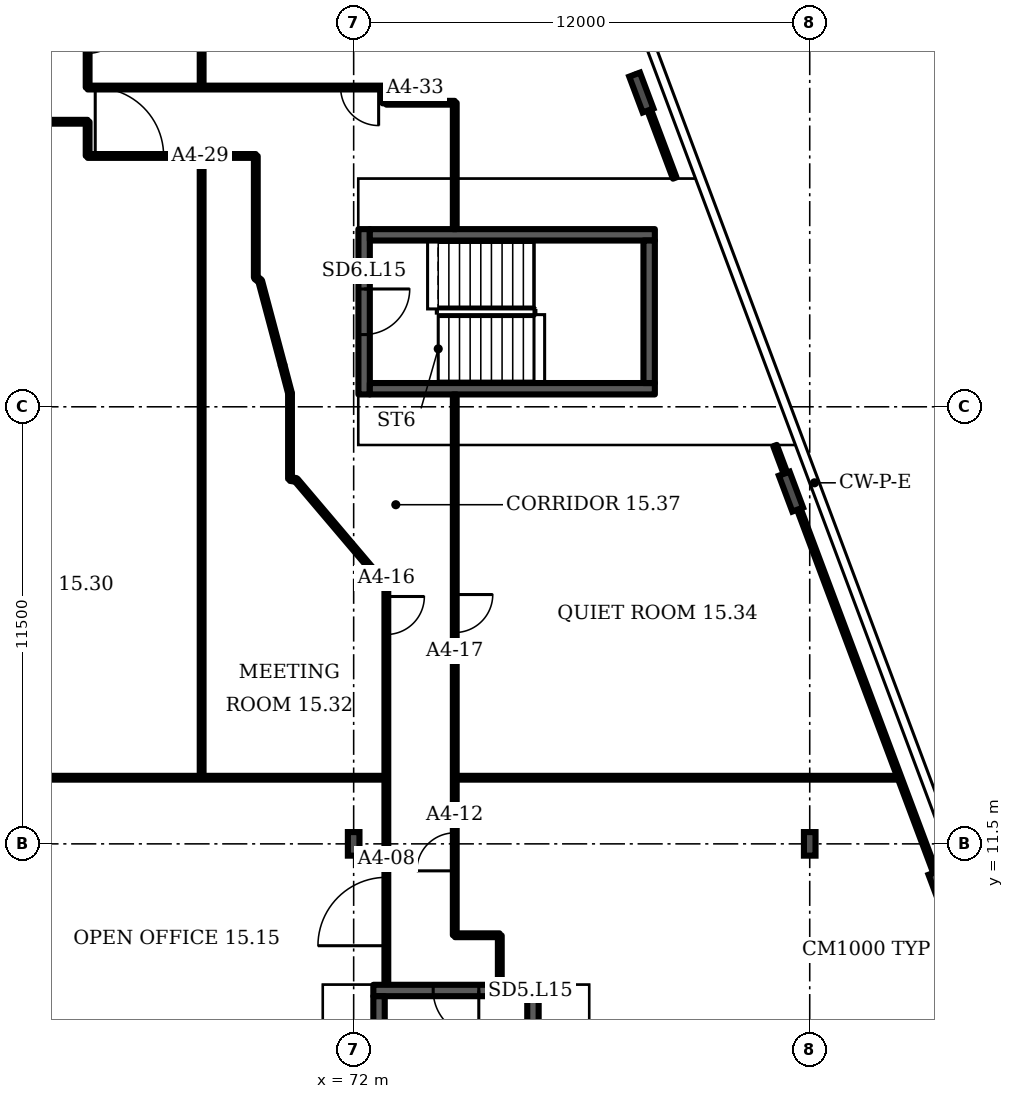
"""IFC4 building model, lengths in metres.
Left out: names, types, materials, properties, quantities, classifications, styles, units other than length and angle.
Written with IfcOpenShell. Run it as: python <this file> out.ifc"""

import sys

from ifc_helpers import new_model, si_unit, direction, frame, frame_2d, origin, origin_2d, place, context, subcontext, project, spatial, rectangle, i_section, extrude, element, fill, save


model = new_model("IFC4")
c1 = context("Model", 3, precision=1e-05, world=origin(), true_north=direction((0.0, 1.0)))
c2 = subcontext(c1, "Body", "Model", "MODEL_VIEW")
j1 = project(units=[si_unit("LENGTHUNIT", "METRE"), si_unit("PLANEANGLEUNIT", "RADIAN")], contexts=[c1])
p1 = place(None, origin())
s1 = spatial("IfcSite", under=j1, at=p1, CompositionType="ELEMENT")
p2 = place(p1, origin())
s2 = spatial("IfcBuilding", under=s1, at=p2, CompositionType="ELEMENT")
p3 = place(p2, frame((0.0, 0.0, 73.9)))
s3 = spatial("IfcBuildingStorey", under=s2, at=p3, CompositionType="ELEMENT", Elevation=73.9)
for number, where, z_axis, x_axis in (
    (1, (87.445, 10.268, 0.0), (0.0, 0.0, 1.0), (0.936, 0.351, 0.0)),
    (2, (83.507, 20.768, 0.0), (0.0, 0.0, 1.0), (0.936, 0.351, 0.0)),
    (3, (79.57, 31.268, 0.0), (0.0, 0.0, 1.0), (0.936, 0.351, 0.0)),
):
    element("IfcColumn", number, at=place(p3, frame(where, z_axis=z_axis, x_axis=x_axis)), inside=s3, PredefinedType="COLUMN", context=c2, shape_type="SweptSolid", body=[
        extrude(i_section(OverallWidth=0.302, OverallDepth=1.008, WebThickness=0.021, FlangeThickness=0.04, FilletRadius=0.03, at=origin_2d()), origin(), (0.0, 0.0, 1.0), 3.6),
    ])
for number, where, z_axis, x_axis in (
    (4, (72.0, 11.5, 0.0), (0.0, 0.0, 1.0), (1.0, 0.0, 0.0)),
    (5, (84.0, 11.5, 0.0), (0.0, 0.0, 1.0), (1.0, 0.0, 0.0)),
):
    element("IfcColumn", number, at=place(p3, frame(where, z_axis=z_axis, x_axis=x_axis)), inside=s3, PredefinedType="COLUMN", context=c2, shape_type="SweptSolid", body=[
        extrude(i_section(OverallWidth=0.305, OverallDepth=0.62, WebThickness=0.021, FlangeThickness=0.04, FilletRadius=0.027, at=origin_2d()), origin(), (0.0, 0.0, 1.0), 3.6),
    ])
p4 = place(p3, frame((72.518, 7.642, 0.0), z_axis=(0.0, 0.0, 1.0), x_axis=(1.0, 0.0, 0.0)))
e6 = element("IfcWall", 6, at=p4, inside=s3, PredefinedType="SHEAR", context=c2, shape_type="SweptSolid", body=[
    extrude(rectangle(XDim=4.35, YDim=0.3, at=frame_2d((2.175, 0.0))), origin(), (0.0, 0.0, 1.0), 3.2),
])
p5 = place(p4, frame((1.575, 0.0, 0.0)))
e7 = element("IfcOpeningElement", 7, at=p5, cuts=e6, PredefinedType="OPENING", context=c2, shape_type="SweptSolid", body=[
    extrude(rectangle(XDim=1.2, YDim=2.1, at=frame_2d((0.6, 1.05))), frame((0.0, 0.16, 0.0), z_axis=(0.0, -1.0, 0.0), x_axis=(1.0, 0.0, 0.0)), (0.0, 0.0, 1.0), 0.32),
])
p6 = place(p3, frame((72.275, 23.325, 0.0), z_axis=(0.0, 0.0, 1.0), x_axis=(0.0, 1.0, 0.0)))
e8 = element("IfcWall", 8, at=p6, inside=s3, PredefinedType="SHEAR", context=c2, shape_type="SweptSolid", body=[
    extrude(rectangle(XDim=4.35, YDim=0.3, at=frame_2d((2.175, 0.0))), origin(), (0.0, 0.0, 1.0), 3.2),
])
p7 = place(p6, frame((1.575, 0.0, 0.0)))
e9 = element("IfcOpeningElement", 9, at=p7, cuts=e8, PredefinedType="OPENING", context=c2, shape_type="SweptSolid", body=[
    extrude(rectangle(XDim=1.2, YDim=2.1, at=frame_2d((0.6, 1.05))), frame((0.0, 0.16, 0.0), z_axis=(0.0, -1.0, 0.0), x_axis=(1.0, 0.0, 0.0)), (0.0, 0.0, 1.0), 0.32),
])
p8 = place(p3, frame((45.3, 13.24, 0.0), z_axis=(0.0, 0.0, 1.0), x_axis=(1.0, 0.0, 0.0)))
e10 = element("IfcWall", 10, at=p8, inside=s3, PredefinedType="PARTITIONING", context=c2, shape_type="SweptSolid", body=[
    extrude(rectangle(XDim=27.56, YDim=0.1, at=frame_2d((13.78, 0.0))), origin(), (0.0, 0.0, 1.0), 3.2),
])
p9 = place(p3, frame((45.3, 30.5, 0.0), z_axis=(0.0, 0.0, 1.0), x_axis=(1.0, 0.0, 0.0)))
e11 = element("IfcWall", 11, at=p9, inside=s3, PredefinedType="PARTITIONING", context=c2, shape_type="SweptSolid", body=[
    extrude(rectangle(XDim=19.7, YDim=0.1, at=frame_2d((9.85, 0.0))), origin(), (0.0, 0.0, 1.0), 3.2),
])
p10 = place(p3, frame((65.0, 29.6, 0.0), z_axis=(0.0, 0.0, 1.0), x_axis=(0.0, 1.0, 0.0)))
e12 = element("IfcWall", 12, at=p10, inside=s3, PredefinedType="PARTITIONING", context=c2, shape_type="SweptSolid", body=[
    extrude(rectangle(XDim=0.9, YDim=0.1, at=frame_2d((0.45, 0.0))), origin(), (0.0, 0.0, 1.0), 3.2),
])
p11 = place(p3, frame((65.0, 29.6, 0.0), z_axis=(0.0, 0.0, 1.0), x_axis=(1.0, 0.0, 0.0)))
e13 = element("IfcWall", 13, at=p11, inside=s3, PredefinedType="PARTITIONING", context=c2, shape_type="SweptSolid", body=[
    extrude(rectangle(XDim=4.425, YDim=0.1, at=frame_2d((2.212, 0.0))), origin(), (0.0, 0.0, 1.0), 3.2),
])
p12 = place(p11, frame((0.2, 0.0, 0.0)))
e14 = element("IfcOpeningElement", 14, at=p12, cuts=e13, PredefinedType="OPENING", context=c2, shape_type="SweptSolid", body=[
    extrude(rectangle(XDim=1.8, YDim=2.1, at=frame_2d((0.9, 1.05))), frame((0.0, 0.06, 0.0), z_axis=(0.0, -1.0, 0.0), x_axis=(1.0, 0.0, 0.0)), (0.0, 0.0, 1.0), 0.12),
])
p13 = place(p3, frame((65.0, 31.4, 0.0), z_axis=(0.0, 0.0, 1.0), x_axis=(0.0, 1.0, 0.0)))
e15 = element("IfcWall", 15, at=p13, inside=s3, PredefinedType="PARTITIONING", context=c2, shape_type="SweptSolid", body=[
    extrude(rectangle(XDim=2.58, YDim=0.1, at=frame_2d((1.29, 0.0))), origin(), (0.0, 0.0, 1.0), 3.2),
])
p14 = place(p13, frame((0.9, 0.0, 0.0)))
e16 = element("IfcOpeningElement", 16, at=p14, cuts=e15, PredefinedType="OPENING", context=c2, shape_type="SweptSolid", body=[
    extrude(rectangle(XDim=1.0, YDim=2.1, at=frame_2d((0.5, 1.05))), frame((0.0, 0.06, 0.0), z_axis=(0.0, -1.0, 0.0), x_axis=(1.0, 0.0, 0.0)), (0.0, 0.0, 1.0), 0.12),
])
p15 = place(p3, frame((65.0, 31.4, 0.0), z_axis=(0.0, 0.0, 1.0), x_axis=(1.0, 0.0, 0.0)))
e17 = element("IfcWall", 17, at=p15, inside=s3, PredefinedType="PARTITIONING", context=c2, shape_type="SweptSolid", body=[
    extrude(rectangle(XDim=7.81, YDim=0.1, at=frame_2d((3.905, 0.0))), origin(), (0.0, 0.0, 1.0), 3.2),
])
p16 = place(p15, frame((6.657, 0.0, 0.0)))
e18 = element("IfcOpeningElement", 18, at=p16, cuts=e17, PredefinedType="OPENING", context=c2, shape_type="SweptSolid", body=[
    extrude(rectangle(XDim=1.0, YDim=2.1, at=frame_2d((0.5, 1.05))), frame((0.0, 0.06, 0.0), z_axis=(0.0, -1.0, 0.0), x_axis=(1.0, 0.0, 0.0)), (0.0, 0.0, 1.0), 0.12),
])
p17 = place(p3, frame((68.0, 13.24, 0.0), z_axis=(0.0, 0.0, 1.0), x_axis=(0.0, 1.0, 0.0)))
e19 = element("IfcWall", 19, at=p17, inside=s3, PredefinedType="PARTITIONING", context=c2, shape_type="SweptSolid", body=[
    extrude(rectangle(XDim=16.36, YDim=0.1, at=frame_2d((8.18, 0.0))), origin(), (0.0, 0.0, 1.0), 3.2),
])
p18 = place(p3, frame((68.0, 31.4, 0.0), z_axis=(0.0, 0.0, 1.0), x_axis=(0.0, 1.0, 0.0)))
e20 = element("IfcWall", 20, at=p18, inside=s3, PredefinedType="PARTITIONING", context=c2, shape_type="SweptSolid", body=[
    extrude(rectangle(XDim=8.39, YDim=0.1, at=frame_2d((4.195, 0.0))), origin(), (0.0, 0.0, 1.0), 3.2),
])
p19 = place(p3, frame((69.425, 26.4, 0.0), z_axis=(0.0, 0.0, 1.0), x_axis=(0.0, 1.0, 0.0)))
e21 = element("IfcWall", 21, at=p19, inside=s3, PredefinedType="PARTITIONING", context=c2, shape_type="SweptSolid", body=[
    extrude(rectangle(XDim=3.2, YDim=0.1, at=frame_2d((1.6, 0.0))), origin(), (0.0, 0.0, 1.0), 3.2),
])
p20 = place(p3, frame((69.54, 26.31, 0.0), z_axis=(0.0, 0.0, 1.0), x_axis=(-0.787997, 0.615675, 0.0)))
e22 = element("IfcWall", 22, at=p20, inside=s3, PredefinedType="PARTITIONING", context=c2, shape_type="SweptSolid", body=[
    extrude(rectangle(XDim=0.146, YDim=0.1, at=frame_2d((0.073, 0.0))), origin(), (0.0, 0.0, 1.0), 3.2),
])
p21 = place(p3, frame((70.13, 24.095, 0.0), z_axis=(0.0, 0.0, 1.0), x_axis=(-0.257318, 0.966327, 0.0)))
e23 = element("IfcWall", 23, at=p21, inside=s3, PredefinedType="PARTITIONING", context=c2, shape_type="SweptSolid", body=[
    extrude(rectangle(XDim=2.292, YDim=0.1, at=frame_2d((1.146, 0.0))), origin(), (0.0, 0.0, 1.0), 3.2),
])
p22 = place(p3, frame((70.325, 21.1, 0.0), z_axis=(0.0, 0.0, 1.0), x_axis=(0.0, 1.0, 0.0)))
e24 = element("IfcWall", 24, at=p22, inside=s3, PredefinedType="PARTITIONING", context=c2, shape_type="SweptSolid", body=[
    extrude(rectangle(XDim=2.255, YDim=0.1, at=frame_2d((1.127, 0.0))), origin(), (0.0, 0.0, 1.0), 3.2),
])
p23 = place(p3, frame((70.325, 23.355, 0.0), z_axis=(0.0, 0.0, 1.0), x_axis=(-0.254901, 0.966965, 0.0)))
e25 = element("IfcWall", 25, at=p23, inside=s3, PredefinedType="PARTITIONING", context=c2, shape_type="SweptSolid", body=[
    extrude(rectangle(XDim=0.765, YDim=0.1, at=frame_2d((0.383, 0.0))), origin(), (0.0, 0.0, 1.0), 3.2),
])
p24 = place(p3, frame((70.485, 21.075, 0.0), z_axis=(0.0, 0.0, 1.0), x_axis=(-0.987098, 0.160112, 0.0)))
e26 = element("IfcWall", 26, at=p24, inside=s3, PredefinedType="PARTITIONING", context=c2, shape_type="SweptSolid", body=[
    extrude(rectangle(XDim=0.157, YDim=0.1, at=frame_2d((0.079, 0.0))), origin(), (0.0, 0.0, 1.0), 3.2),
])
p25 = place(p3, frame((72.81, 30.985, 0.0), z_axis=(0.0, 0.0, 1.0), x_axis=(0.0, 1.0, 0.0)))
e27 = element("IfcWall", 27, at=p25, inside=s3, PredefinedType="PARTITIONING", context=c2, shape_type="SweptSolid", body=[
    extrude(rectangle(XDim=0.415, YDim=0.1, at=frame_2d((0.208, 0.0))), origin(), (0.0, 0.0, 1.0), 3.2),
])
p26 = place(p3, frame((72.86, 7.812, 0.0), z_axis=(0.0, 0.0, 1.0), x_axis=(0.0, 1.0, 0.0)))
e28 = element("IfcWall", 28, at=p26, inside=s3, PredefinedType="PARTITIONING", context=c2, shape_type="SweptSolid", body=[
    extrude(rectangle(XDim=10.463, YDim=0.1, at=frame_2d((5.231, 0.0))), origin(), (0.0, 0.0, 1.0), 3.2),
])
p27 = place(p26, frame((1.008, 0.0, 0.0)))
e29 = element("IfcOpeningElement", 29, at=p27, cuts=e28, PredefinedType="OPENING", context=c2, shape_type="SweptSolid", body=[
    extrude(rectangle(XDim=1.8, YDim=2.1, at=frame_2d((0.9, 1.05))), frame((0.0, 0.06, 0.0), z_axis=(0.0, -1.0, 0.0), x_axis=(1.0, 0.0, 0.0)), (0.0, 0.0, 1.0), 0.12),
])
p28 = place(p26, frame((9.197, 0.0, 0.0)))
e30 = element("IfcOpeningElement", 30, at=p28, cuts=e28, PredefinedType="OPENING", context=c2, shape_type="SweptSolid", body=[
    extrude(rectangle(XDim=1.0, YDim=2.1, at=frame_2d((0.5, 1.05))), frame((0.0, 0.06, 0.0), z_axis=(0.0, -1.0, 0.0), x_axis=(1.0, 0.0, 0.0)), (0.0, 0.0, 1.0), 0.12),
])
p29 = place(p3, frame((72.86, 31.0, 0.0), z_axis=(0.0, 0.0, 1.0), x_axis=(1.0, 0.0, 0.0)))
e31 = element("IfcWall", 31, at=p29, inside=s3, PredefinedType="PARTITIONING", context=c2, shape_type="SweptSolid", body=[
    extrude(rectangle(XDim=1.8, YDim=0.1, at=frame_2d((0.9, 0.0))), origin(), (0.0, 0.0, 1.0), 3.2),
])
p30 = place(p3, frame((72.86, 18.275, 0.0), z_axis=(0.0, 0.0, 1.0), x_axis=(-0.646848, 0.762613, 0.0)))
e32 = element("IfcWall", 32, at=p30, inside=s3, PredefinedType="PARTITIONING", context=c2, shape_type="SweptSolid", body=[
    extrude(rectangle(XDim=3.672, YDim=0.1, at=frame_2d((1.836, 0.0))), origin(), (0.0, 0.0, 1.0), 3.2),
])
p31 = place(p3, frame((74.66, 9.095, 0.0), z_axis=(0.0, 0.0, 1.0), x_axis=(0.0, 1.0, 0.0)))
e33 = element("IfcWall", 33, at=p31, inside=s3, PredefinedType="PARTITIONING", context=c2, shape_type="SweptSolid", body=[
    extrude(rectangle(XDim=14.23, YDim=0.1, at=frame_2d((7.115, 0.0))), origin(), (0.0, 0.0, 1.0), 3.2),
])
p32 = place(p31, frame((1.695, 0.0, 0.0)))
e34 = element("IfcOpeningElement", 34, at=p32, cuts=e33, PredefinedType="OPENING", context=c2, shape_type="SweptSolid", body=[
    extrude(rectangle(XDim=1.0, YDim=2.1, at=frame_2d((0.5, 1.05))), frame((0.0, 0.06, 0.0), z_axis=(0.0, -1.0, 0.0), x_axis=(1.0, 0.0, 0.0)), (0.0, 0.0, 1.0), 0.12),
])
p33 = place(p31, frame((7.965, 0.0, 0.0)))
e35 = element("IfcOpeningElement", 35, at=p33, cuts=e33, PredefinedType="OPENING", context=c2, shape_type="SweptSolid", body=[
    extrude(rectangle(XDim=1.0, YDim=2.1, at=frame_2d((0.5, 1.05))), frame((0.0, 0.06, 0.0), z_axis=(0.0, -1.0, 0.0), x_axis=(1.0, 0.0, 0.0)), (0.0, 0.0, 1.0), 0.12),
])
p34 = place(p3, frame((74.66, 27.675, 0.0), z_axis=(0.0, 0.0, 1.0), x_axis=(0.0, 1.0, 0.0)))
e36 = element("IfcWall", 36, at=p34, inside=s3, PredefinedType="PARTITIONING", context=c2, shape_type="SweptSolid", body=[
    extrude(rectangle(XDim=3.325, YDim=0.1, at=frame_2d((1.663, 0.0))), origin(), (0.0, 0.0, 1.0), 3.2),
])
p35 = place(p3, frame((74.665, 9.095, 0.0), z_axis=(0.0, 0.0, 1.0), x_axis=(1.0, 0.0, 0.0)))
e37 = element("IfcWall", 37, at=p35, inside=s3, PredefinedType="PARTITIONING", context=c2, shape_type="SweptSolid", body=[
    extrude(rectangle(XDim=1.175, YDim=0.1, at=frame_2d((0.587, 0.0))), origin(), (0.0, 0.0, 1.0), 3.2),
])
p36 = place(p3, frame((74.665, 13.24, 0.0), z_axis=(0.0, 0.0, 1.0), x_axis=(1.0, 0.0, 0.0)))
e38 = element("IfcWall", 38, at=p36, inside=s3, PredefinedType="PARTITIONING", context=c2, shape_type="SweptSolid", body=[
    extrude(rectangle(XDim=11.7, YDim=0.1, at=frame_2d((5.85, 0.0))), origin(), (0.0, 0.0, 1.0), 3.2),
])
p37 = place(p3, frame((75.845, 7.812, 0.0), z_axis=(0.0, 0.0, 1.0), x_axis=(0.0, 1.0, 0.0)))
e39 = element("IfcWall", 39, at=p37, inside=s3, PredefinedType="PARTITIONING", context=c2, shape_type="SweptSolid", body=[
    extrude(rectangle(XDim=1.278, YDim=0.1, at=frame_2d((0.639, 0.0))), origin(), (0.0, 0.0, 1.0), 3.2),
])
p38 = place(p3, frame((80.448, 29.02, 0.0), z_axis=(0.0, 0.0, 1.0), x_axis=(-0.35129, 0.93627, 0.0)))
e40 = element("IfcWall", 40, at=p38, inside=s3, PredefinedType="PARTITIONING", context=c2, shape_type="SweptSolid", body=[
    extrude(rectangle(XDim=2.911, YDim=0.1, at=frame_2d((1.455, 0.0))), origin(), (0.0, 0.0, 1.0), 2.58),
])
p39 = place(p3, frame((87.65, 9.81, 0.0), z_axis=(0.0, 0.0, 1.0), x_axis=(-0.35104, 0.936357, 0.0)))
e41 = element("IfcWall", 41, at=p39, inside=s3, PredefinedType="PARTITIONING", context=c2, shape_type="SweptSolid", body=[
    extrude(rectangle(XDim=12.997, YDim=0.1, at=frame_2d((6.499, 0.0))), origin(), (0.0, 0.0, 1.0), 2.58),
])
for number, where, z_axis, x_axis in (
    (42, (72.667, -0.008, 0.0), (0.0, 0.0, 1.0), (0.0, 1.0, 0.0)),
    (43, (76.718, -0.008, 0.0), (0.0, 0.0, 1.0), (0.0, 1.0, 0.0)),
    (44, (72.425, 23.475, 0.0), (0.0, 0.0, 1.0), (1.0, 0.0, 0.0)),
    (45, (72.425, 27.525, 0.0), (0.0, 0.0, 1.0), (1.0, 0.0, 0.0)),
):
    element("IfcWall", number, at=place(p3, frame(where, z_axis=z_axis, x_axis=x_axis)), inside=s3, PredefinedType="SHEAR", context=c2, shape_type="SweptSolid", body=[
        extrude(rectangle(XDim=7.5, YDim=0.3, at=frame_2d((3.75, 0.0))), origin(), (0.0, 0.0, 1.0), 3.2),
    ])
p40 = place(p3, frame((79.775, 23.625, 0.0), z_axis=(0.0, 0.0, 1.0), x_axis=(0.0, 1.0, 0.0)))
e46 = element("IfcWall", 46, at=p40, inside=s3, PredefinedType="SHEAR", context=c2, shape_type="SweptSolid", body=[
    extrude(rectangle(XDim=3.75, YDim=0.3, at=frame_2d((1.875, 0.0))), origin(), (0.0, 0.0, 1.0), 3.2),
])
p41 = place(p5, origin())
e47 = element("IfcDoor", 47, at=p41, inside=s3, OperationType="SINGLE_SWING_RIGHT", PredefinedType="DOOR", context=c2, shape_type="SweptSolid", body=[
    extrude(rectangle(XDim=1.2, YDim=2.1, at=frame_2d((0.6, 1.05))), frame((0.0, 0.025, 0.0), z_axis=(0.0, -1.0, 0.0), x_axis=(1.0, 0.0, 0.0)), (0.0, 0.0, 1.0), 0.05),
])
fill(e7, e47)
p42 = place(p7, origin())
e48 = element("IfcDoor", 48, at=p42, inside=s3, OperationType="SINGLE_SWING_RIGHT", PredefinedType="DOOR", context=c2, shape_type="SweptSolid", body=[
    extrude(rectangle(XDim=1.2, YDim=2.1, at=frame_2d((0.6, 1.05))), frame((0.0, 0.025, 0.0), z_axis=(0.0, -1.0, 0.0), x_axis=(1.0, 0.0, 0.0)), (0.0, 0.0, 1.0), 0.05),
])
fill(e9, e48)
p43 = place(p27, origin())
e49 = element("IfcDoor", 49, at=p43, inside=s3, OperationType="DOUBLE_DOOR_SINGLE_SWING", PredefinedType="DOOR", context=c2, shape_type="SweptSolid", body=[
    extrude(rectangle(XDim=1.8, YDim=2.1, at=frame_2d((0.9, 1.05))), frame((0.0, 0.025, 0.0), z_axis=(0.0, -1.0, 0.0), x_axis=(1.0, 0.0, 0.0)), (0.0, 0.0, 1.0), 0.05),
])
fill(e29, e49)
p44 = place(p32, origin())
e50 = element("IfcDoor", 50, at=p44, inside=s3, OperationType="SINGLE_SWING_LEFT", PredefinedType="DOOR", context=c2, shape_type="SweptSolid", body=[
    extrude(rectangle(XDim=1.0, YDim=2.1, at=frame_2d((0.5, 1.05))), frame((0.0, 0.025, 0.0), z_axis=(0.0, -1.0, 0.0), x_axis=(1.0, 0.0, 0.0)), (0.0, 0.0, 1.0), 0.05),
])
fill(e34, e50)
p45 = place(p28, origin())
e51 = element("IfcDoor", 51, at=p45, inside=s3, OperationType="SINGLE_SWING_RIGHT", PredefinedType="DOOR", context=c2, shape_type="SweptSolid", body=[
    extrude(rectangle(XDim=1.0, YDim=2.1, at=frame_2d((0.5, 1.05))), frame((0.0, 0.025, 0.0), z_axis=(0.0, -1.0, 0.0), x_axis=(1.0, 0.0, 0.0)), (0.0, 0.0, 1.0), 0.05),
])
fill(e30, e51)
p46 = place(p33, origin())
e52 = element("IfcDoor", 52, at=p46, inside=s3, OperationType="SINGLE_SWING_RIGHT", PredefinedType="DOOR", context=c2, shape_type="SweptSolid", body=[
    extrude(rectangle(XDim=1.0, YDim=2.1, at=frame_2d((0.5, 1.05))), frame((0.0, 0.025, 0.0), z_axis=(0.0, -1.0, 0.0), x_axis=(1.0, 0.0, 0.0)), (0.0, 0.0, 1.0), 0.05),
])
fill(e35, e52)
p47 = place(p12, origin())
e53 = element("IfcDoor", 53, at=p47, inside=s3, OperationType="DOUBLE_DOOR_SINGLE_SWING", PredefinedType="DOOR", context=c2, shape_type="SweptSolid", body=[
    extrude(rectangle(XDim=1.8, YDim=2.1, at=frame_2d((0.9, 1.05))), frame((0.0, 0.025, 0.0), z_axis=(0.0, -1.0, 0.0), x_axis=(1.0, 0.0, 0.0)), (0.0, 0.0, 1.0), 0.05),
])
fill(e14, e53)
p48 = place(p16, origin())
e54 = element("IfcDoor", 54, at=p48, inside=s3, OperationType="SINGLE_SWING_RIGHT", PredefinedType="DOOR", context=c2, shape_type="SweptSolid", body=[
    extrude(rectangle(XDim=1.0, YDim=2.1, at=frame_2d((0.5, 1.05))), frame((0.0, 0.025, 0.0), z_axis=(0.0, -1.0, 0.0), x_axis=(1.0, 0.0, 0.0)), (0.0, 0.0, 1.0), 0.05),
])
fill(e18, e54)
p49 = place(p14, origin())
e55 = element("IfcDoor", 55, at=p49, inside=s3, OperationType="SINGLE_SWING_RIGHT", PredefinedType="DOOR", context=c2, shape_type="SweptSolid", body=[
    extrude(rectangle(XDim=1.0, YDim=2.1, at=frame_2d((0.5, 1.05))), frame((0.0, 0.025, 0.0), z_axis=(0.0, -1.0, 0.0), x_axis=(1.0, 0.0, 0.0)), (0.0, 0.0, 1.0), 0.05),
])
fill(e16, e55)
save(model, sys.argv[1])
